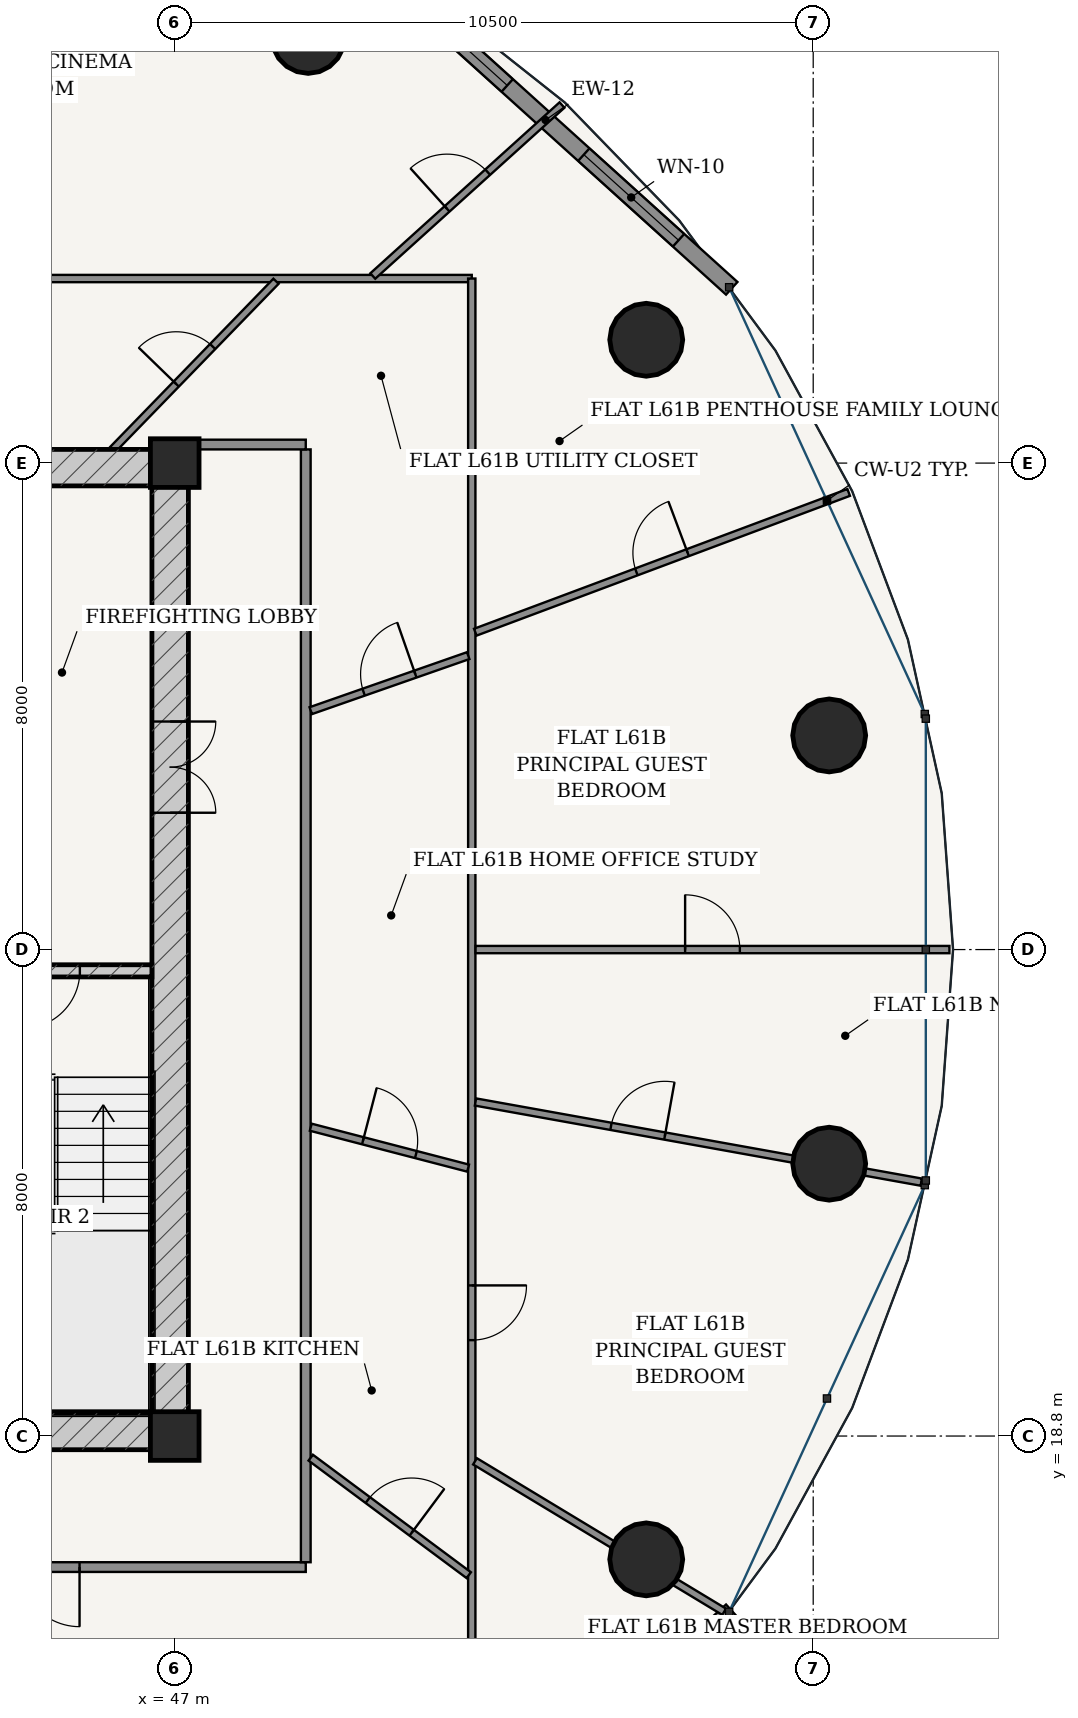
"""IFC4 building model, lengths in metres.
Left out: names, types, materials, properties, quantities, classifications, styles, units other than length and angle.
Written with IfcOpenShell. Run it as: python <this file> out.ifc"""

import sys

from ifc_helpers import new_model, si_unit, direction, frame, frame_2d, origin, origin_2d, place, context, subcontext, project, spatial, rectangle, hollow_circle, extrude, source, transform, mapped, element, fill, save


model = new_model("IFC4")
c1 = context("Model", 3, precision=1e-05, world=origin(), true_north=direction((-0.2419218956, 0.970295726276)))
c2 = subcontext(c1, "Body", "Model", "MODEL_VIEW")
j1 = project(units=[si_unit("LENGTHUNIT", "METRE"), si_unit("PLANEANGLEUNIT", "RADIAN")], contexts=[c1])
p1 = place(None, origin())
s1 = spatial("IfcSite", under=j1, at=p1, CompositionType="ELEMENT")
p2 = place(p1, origin())
s2 = spatial("IfcBuilding", under=s1, at=p2, CompositionType="ELEMENT")
p3 = place(p2, frame((0.0, 0.0, 231.9)))
s3 = spatial("IfcBuildingStorey", under=s2, at=p3, CompositionType="ELEMENT", Elevation=231.9)
for number, where, z_axis, x_axis in (
    (1, (47.0, 18.8, 0.0), (0.0, 0.0, 1.0), (1.0, 0.0, 0.0)),
    (2, (47.0, 34.8, 0.0), (0.0, 0.0, 1.0), (1.0, 0.0, 0.0)),
):
    element("IfcColumn", number, at=place(p3, frame(where, z_axis=z_axis, x_axis=x_axis)), inside=s3, PredefinedType="COLUMN", context=c2, shape_type="SweptSolid", body=[
        extrude(rectangle(XDim=0.8, YDim=0.8, at=origin_2d()), origin(), (0.0, 0.0, 1.0), 3.7),
    ])
p4 = place(p3, frame((28.775, 18.875, 0.0), z_axis=(0.0, 0.0, 1.0), x_axis=(1.0, 0.0, 0.0)))
e3 = element("IfcWall", 3, at=p4, inside=s3, PredefinedType="SHEAR", context=c2, shape_type="SweptSolid", body=[
    extrude(rectangle(XDim=18.45, YDim=0.6, at=frame_2d((9.225, 0.0))), origin(), (0.0, 0.0, 1.0), 3.435),
])
p5 = place(p4, frame((8.8, 0.0, 0.0)))
e4 = element("IfcOpeningElement", 4, at=p5, cuts=e3, PredefinedType="OPENING", context=c2, shape_type="SweptSolid", body=[
    extrude(rectangle(XDim=0.85, YDim=2.1, at=frame_2d((0.425, 1.05))), frame((0.0, 0.31, 0.0), z_axis=(0.0, -1.0, 0.0), x_axis=(1.0, 0.0, 0.0)), (0.0, 0.0, 1.0), 0.62),
])
p6 = place(p3, frame((28.775, 34.725, 0.0), z_axis=(0.0, 0.0, 1.0), x_axis=(1.0, 0.0, 0.0)))
e5 = element("IfcWall", 5, at=p6, inside=s3, PredefinedType="SHEAR", context=c2, shape_type="SweptSolid", body=[
    extrude(rectangle(XDim=18.45, YDim=0.6, at=frame_2d((9.225, 0.0))), origin(), (0.0, 0.0, 1.0), 3.435),
])
p7 = place(p3, frame((46.925, 19.175, 0.0), z_axis=(0.0, 0.0, 1.0), x_axis=(0.0, 1.0, 0.0)))
e6 = element("IfcWall", 6, at=p7, inside=s3, PredefinedType="SHEAR", context=c2, shape_type="SweptSolid", body=[
    extrude(rectangle(XDim=15.25, YDim=0.6, at=frame_2d((7.625, 0.0))), origin(), (0.0, 0.0, 1.0), 3.435),
])
p8 = place(p7, frame((9.875, 0.0, 0.0)))
e7 = element("IfcOpeningElement", 7, at=p8, cuts=e6, PredefinedType="OPENING", context=c2, shape_type="SweptSolid", body=[
    extrude(rectangle(XDim=1.5, YDim=2.2, at=frame_2d((0.75, 1.1))), frame((0.0, 0.31, 0.0), z_axis=(0.0, -1.0, 0.0), x_axis=(1.0, 0.0, 0.0)), (0.0, 0.0, 1.0), 0.62),
])
p9 = place(p3, frame((43.305, 26.45, 0.0), z_axis=(0.0, 0.0, 1.0), x_axis=(1.0, 0.0, 0.0)))
e8 = element("IfcWall", 8, at=p9, inside=s3, PredefinedType="SOLIDWALL", context=c2, shape_type="SweptSolid", body=[
    extrude(rectangle(XDim=3.32, YDim=0.2, at=frame_2d((1.66, 0.0))), origin(), (0.0, 0.0, 1.0), 3.435),
])
p10 = place(p9, frame((1.185, 0.0, 0.0)))
e9 = element("IfcOpeningElement", 9, at=p10, cuts=e8, PredefinedType="OPENING", context=c2, shape_type="SweptSolid", body=[
    extrude(rectangle(XDim=0.95, YDim=2.15, at=frame_2d((0.475, 1.075))), frame((0.0, 0.11, 0.0), z_axis=(0.0, -1.0, 0.0), x_axis=(1.0, 0.0, 0.0)), (0.0, 0.0, 1.0), 0.22),
])
for number, where, z_axis, x_axis in (
    (10, (57.763, 30.321, 0.0), (0.0, 0.0, 1.0), (1.0, 0.0, 0.0)),
    (11, (54.754, 36.828, 0.0), (0.0, 0.0, 1.0), (1.0, 0.0, 0.0)),
    (12, (49.195, 41.808, 0.0), (0.0, 0.0, 1.0), (1.0, 0.0, 0.0)),
    (13, (54.754, 16.772, 0.0), (0.0, 0.0, 1.0), (1.0, 0.0, 0.0)),
    (14, (57.763, 23.279, 0.0), (0.0, 0.0, 1.0), (1.0, 0.0, 0.0)),
):
    element("IfcColumn", number, at=place(p3, frame(where, z_axis=z_axis, x_axis=x_axis)), inside=s3, PredefinedType="COLUMN", context=c2, shape_type="SweptSolid", body=[
        extrude(hollow_circle(Radius=0.6, WallThickness=0.038, at=origin_2d()), origin(), (0.0, 0.0, 1.0), 3.7),
    ])
p11 = place(p3, frame((56.16, 37.674, 0.0), z_axis=(0.0, 0.0, 1.0), x_axis=(-0.741972126783, 0.670430729514, 0.0)))
e15 = element("IfcWall", 15, at=p11, inside=s3, PredefinedType="SOLIDWALL", context=c2, shape_type="SweptSolid", body=[
    extrude(rectangle(XDim=8.255, YDim=0.28, at=frame_2d((4.127, 0.0))), origin(), (0.0, 0.0, 1.0), 3.435),
])
p12 = place(p11, frame((1.179, 0.0, 0.85)))
e16 = element("IfcOpeningElement", 16, at=p12, cuts=e15, PredefinedType="OPENING", context=c2, shape_type="SweptSolid", body=[
    extrude(rectangle(XDim=2.1, YDim=1.95, at=frame_2d((1.05, 0.975))), frame((0.0, 0.15, 0.0), z_axis=(0.0, -1.0, 0.0), x_axis=(1.0, 0.0, 0.0)), (0.0, 0.0, 1.0), 0.3),
])
p13 = place(p11, frame((4.976, 0.0, 0.85)))
e17 = element("IfcOpeningElement", 17, at=p13, cuts=e15, PredefinedType="OPENING", context=c2, shape_type="SweptSolid", body=[
    extrude(rectangle(XDim=2.1, YDim=1.95, at=frame_2d((1.05, 0.975))), frame((0.0, 0.15, 0.0), z_axis=(0.0, -1.0, 0.0), x_axis=(1.0, 0.0, 0.0)), (0.0, 0.0, 1.0), 0.3),
])
p14 = place(p3, frame((50.035, 10.391, 0.0), z_axis=(0.0, 0.0, 1.0), x_axis=(0.741986838603, 0.670414447443, 0.0)))
e18 = element("IfcWall", 18, at=p14, inside=s3, PredefinedType="SOLIDWALL", context=c2, shape_type="SweptSolid", body=[
    extrude(rectangle(XDim=8.255, YDim=0.28, at=frame_2d((4.127, 0.0))), origin(), (0.0, 0.0, 1.0), 3.435),
])
p15 = place(p14, frame((1.179, 0.0, 0.85)))
e19 = element("IfcOpeningElement", 19, at=p15, cuts=e18, PredefinedType="OPENING", context=c2, shape_type="SweptSolid", body=[
    extrude(rectangle(XDim=2.1, YDim=1.95, at=frame_2d((1.05, 0.975))), frame((0.0, 0.15, 0.0), z_axis=(0.0, -1.0, 0.0), x_axis=(1.0, 0.0, 0.0)), (0.0, 0.0, 1.0), 0.3),
])
p16 = place(p14, frame((4.976, 0.0, 0.85)))
e20 = element("IfcOpeningElement", 20, at=p16, cuts=e18, PredefinedType="OPENING", context=c2, shape_type="SweptSolid", body=[
    extrude(rectangle(XDim=2.1, YDim=1.95, at=frame_2d((1.05, 0.975))), frame((0.0, 0.15, 0.0), z_axis=(0.0, -1.0, 0.0), x_axis=(1.0, 0.0, 0.0)), (0.0, 0.0, 1.0), 0.3),
])
p17 = place(p3, frame((34.32, 16.645, 0.0), z_axis=(0.0, 0.0, 1.0), x_axis=(1.0, 0.0, 0.0)))
e21 = element("IfcWall", 21, at=p17, inside=s3, PredefinedType="PARTITIONING", context=c2, shape_type="SweptSolid", body=[
    extrude(rectangle(XDim=14.835, YDim=0.16, at=frame_2d((7.417, 0.0))), origin(), (0.0, 0.0, 1.0), 2.951),
])
p18 = place(p17, frame((10.135, 0.0, 0.0)))
e22 = element("IfcOpeningElement", 22, at=p18, cuts=e21, PredefinedType="OPENING", context=c2, shape_type="SweptSolid", body=[
    extrude(rectangle(XDim=0.98, YDim=2.2, at=frame_2d((0.49, 1.1))), frame((0.0, 0.09, 0.0), z_axis=(0.0, -1.0, 0.0), x_axis=(1.0, 0.0, 0.0)), (0.0, 0.0, 1.0), 0.18),
])
p19 = place(p3, frame((49.155, 16.725, 0.0), z_axis=(0.0, 0.0, 1.0), x_axis=(0.0, 1.0, 0.0)))
e23 = element("IfcWall", 23, at=p19, inside=s3, PredefinedType="PARTITIONING", context=c2, shape_type="SweptSolid", body=[
    extrude(rectangle(XDim=18.3, YDim=0.16, at=frame_2d((9.15, 0.0))), origin(), (0.0, 0.0, 1.0), 2.951),
])
p20 = place(p3, frame((47.225, 35.105, 0.0), z_axis=(0.0, 0.0, 1.0), x_axis=(1.0, 0.0, 0.0)))
e24 = element("IfcWall", 24, at=p20, inside=s3, PredefinedType="PARTITIONING", context=c2, shape_type="SweptSolid", body=[
    extrude(rectangle(XDim=1.93, YDim=0.16, at=frame_2d((0.965, 0.0))), origin(), (0.0, 0.0, 1.0), 3.435),
])
p21 = place(p3, frame((44.415, 37.835, 0.0), z_axis=(0.0, 0.0, 1.0), x_axis=(1.0, 0.0, 0.0)))
e25 = element("IfcWall", 25, at=p21, inside=s3, PredefinedType="PARTITIONING", context=c2, shape_type="SweptSolid", body=[
    extrude(rectangle(XDim=7.47, YDim=0.12, at=frame_2d((3.735, 0.0))), origin(), (0.0, 0.0, 1.0), 2.951),
])
p22 = place(p3, frame((51.885, 37.835, 0.0), z_axis=(0.0, 0.0, 1.0), x_axis=(0.0, -1.0, 0.0)))
e26 = element("IfcWall", 26, at=p22, inside=s3, PredefinedType="PARTITIONING", context=c2, shape_type="SweptSolid", body=[
    extrude(rectangle(XDim=23.92, YDim=0.12, at=frame_2d((11.96, 0.0))), origin(), (0.0, 0.0, 1.0), 2.951),
])
p23 = place(p22, frame((16.558, 0.0, 0.0)))
e27 = element("IfcOpeningElement", 27, at=p23, cuts=e26, PredefinedType="OPENING", context=c2, shape_type="SweptSolid", body=[
    extrude(rectangle(XDim=0.9, YDim=2.15, at=frame_2d((0.45, 1.075))), frame((0.0, 0.07, 0.0), z_axis=(0.0, -1.0, 0.0), x_axis=(1.0, 0.0, 0.0)), (0.0, 0.0, 1.0), 0.14),
])
p24 = place(p3, frame((51.938, 18.384, 0.0), z_axis=(0.0, 0.0, 1.0), x_axis=(0.856058483833, -0.516878972543, 0.0)))
e28 = element("IfcWall", 28, at=p24, inside=s3, PredefinedType="PARTITIONING", context=c2, shape_type="SweptSolid", body=[
    extrude(rectangle(XDim=4.787, YDim=0.12, at=frame_2d((2.393, 0.0))), origin(), (0.0, 0.0, 1.0), 2.951),
])
p25 = place(p3, frame((51.946, 24.293, 0.0), z_axis=(0.0, 0.0, 1.0), x_axis=(0.984227185588, -0.176909149424, 0.0)))
e29 = element("IfcWall", 29, at=p25, inside=s3, PredefinedType="PARTITIONING", context=c2, shape_type="SweptSolid", body=[
    extrude(rectangle(XDim=7.448, YDim=0.12, at=frame_2d((3.724, 0.0))), origin(), (0.0, 0.0, 1.0), 2.951),
])
p26 = place(p25, frame((2.264, 0.0, 0.0)))
e30 = element("IfcOpeningElement", 30, at=p26, cuts=e29, PredefinedType="OPENING", context=c2, shape_type="SweptSolid", body=[
    extrude(rectangle(XDim=0.9, YDim=2.15, at=frame_2d((0.45, 1.075))), frame((0.0, 0.07, 0.0), z_axis=(0.0, -1.0, 0.0), x_axis=(1.0, 0.0, 0.0)), (0.0, 0.0, 1.0), 0.14),
])
p27 = place(p3, frame((51.947, 26.8, 0.0), z_axis=(0.0, 0.0, 1.0), x_axis=(1.0, 0.0, 0.0)))
e31 = element("IfcWall", 31, at=p27, inside=s3, PredefinedType="PARTITIONING", context=c2, shape_type="SweptSolid", body=[
    extrude(rectangle(XDim=7.793, YDim=0.12, at=frame_2d((3.896, 0.0))), origin(), (0.0, 0.0, 1.0), 2.951),
])
p28 = place(p27, frame((3.447, 0.0, 0.0)))
e32 = element("IfcOpeningElement", 32, at=p28, cuts=e31, PredefinedType="OPENING", context=c2, shape_type="SweptSolid", body=[
    extrude(rectangle(XDim=0.9, YDim=2.15, at=frame_2d((0.45, 1.075))), frame((0.0, 0.07, 0.0), z_axis=(0.0, -1.0, 0.0), x_axis=(1.0, 0.0, 0.0)), (0.0, 0.0, 1.0), 0.14),
])
p29 = place(p3, frame((51.943, 32.019, 0.0), z_axis=(0.0, 0.0, 1.0), x_axis=(0.936540194592, 0.350560214389, 0.0)))
e33 = element("IfcWall", 33, at=p29, inside=s3, PredefinedType="PARTITIONING", context=c2, shape_type="SweptSolid", body=[
    extrude(rectangle(XDim=6.556, YDim=0.12, at=frame_2d((3.278, 0.0))), origin(), (0.0, 0.0, 1.0), 2.951),
])
p30 = place(p29, frame((2.828, 0.0, 0.0)))
e34 = element("IfcOpeningElement", 34, at=p30, cuts=e33, PredefinedType="OPENING", context=c2, shape_type="SweptSolid", body=[
    extrude(rectangle(XDim=0.9, YDim=2.15, at=frame_2d((0.45, 1.075))), frame((0.0, 0.07, 0.0), z_axis=(0.0, -1.0, 0.0), x_axis=(1.0, 0.0, 0.0)), (0.0, 0.0, 1.0), 0.14),
])
p31 = place(p3, frame((50.257, 37.876, 0.0), z_axis=(0.0, 0.0, 1.0), x_axis=(0.741943837234, 0.670462036502, 0.0)))
e35 = element("IfcWall", 35, at=p31, inside=s3, PredefinedType="PARTITIONING", context=c2, shape_type="SweptSolid", body=[
    extrude(rectangle(XDim=4.194, YDim=0.12, at=frame_2d((2.097, 0.0))), origin(), (0.0, 0.0, 1.0), 2.951),
])
p32 = place(p31, frame((1.647, 0.0, 0.0)))
e36 = element("IfcOpeningElement", 36, at=p32, cuts=e35, PredefinedType="OPENING", context=c2, shape_type="SweptSolid", body=[
    extrude(rectangle(XDim=0.9, YDim=2.15, at=frame_2d((0.45, 1.075))), frame((0.0, 0.07, 0.0), z_axis=(0.0, -1.0, 0.0), x_axis=(1.0, 0.0, 0.0)), (0.0, 0.0, 1.0), 0.14),
])
p33 = place(p3, frame((49.237, 18.444, 0.0), z_axis=(0.0, 0.0, 1.0), x_axis=(0.802454010275, -0.596713969497, 0.0)))
e37 = element("IfcWall", 37, at=p33, inside=s3, PredefinedType="PARTITIONING", context=c2, shape_type="SweptSolid", body=[
    extrude(rectangle(XDim=3.238, YDim=0.12, at=frame_2d((1.619, 0.0))), origin(), (0.0, 0.0, 1.0), 3.11),
])
p34 = place(p33, frame((1.169, 0.0, 0.0)))
e38 = element("IfcOpeningElement", 38, at=p34, cuts=e37, PredefinedType="OPENING", context=c2, shape_type="SweptSolid", body=[
    extrude(rectangle(XDim=0.9, YDim=2.15, at=frame_2d((0.45, 1.075))), frame((0.0, 0.07, 0.0), z_axis=(0.0, -1.0, 0.0), x_axis=(1.0, 0.0, 0.0)), (0.0, 0.0, 1.0), 0.14),
])
p35 = place(p3, frame((49.237, 23.879, 0.0), z_axis=(0.0, 0.0, 1.0), x_axis=(0.967822506788, -0.251633851765, 0.0)))
e39 = element("IfcWall", 39, at=p35, inside=s3, PredefinedType="PARTITIONING", context=c2, shape_type="SweptSolid", body=[
    extrude(rectangle(XDim=2.674, YDim=0.12, at=frame_2d((1.337, 0.0))), origin(), (0.0, 0.0, 1.0), 3.435),
])
p36 = place(p35, frame((0.887, 0.0, 0.0)))
e40 = element("IfcOpeningElement", 40, at=p36, cuts=e39, PredefinedType="OPENING", context=c2, shape_type="SweptSolid", body=[
    extrude(rectangle(XDim=0.9, YDim=2.15, at=frame_2d((0.45, 1.075))), frame((0.0, 0.07, 0.0), z_axis=(0.0, -1.0, 0.0), x_axis=(1.0, 0.0, 0.0)), (0.0, 0.0, 1.0), 0.14),
])
p37 = place(p3, frame((49.237, 30.729, 0.0), z_axis=(0.0, 0.0, 1.0), x_axis=(0.94398177501, 0.329997588549, 0.0)))
e41 = element("IfcWall", 41, at=p37, inside=s3, PredefinedType="PARTITIONING", context=c2, shape_type="SweptSolid", body=[
    extrude(rectangle(XDim=2.743, YDim=0.12, at=frame_2d((1.372, 0.0))), origin(), (0.0, 0.0, 1.0), 3.11),
])
p38 = place(p37, frame((0.922, 0.0, 0.0)))
e42 = element("IfcOpeningElement", 42, at=p38, cuts=e41, PredefinedType="OPENING", context=c2, shape_type="SweptSolid", body=[
    extrude(rectangle(XDim=0.9, YDim=2.15, at=frame_2d((0.45, 1.075))), frame((0.0, 0.07, 0.0), z_axis=(0.0, -1.0, 0.0), x_axis=(1.0, 0.0, 0.0)), (0.0, 0.0, 1.0), 0.14),
])
p39 = place(p3, frame((45.983, 35.026, 0.0), z_axis=(0.0, 0.0, 1.0), x_axis=(0.696410097703, 0.717644045344, 0.0)))
e43 = element("IfcWall", 43, at=p39, inside=s3, PredefinedType="PARTITIONING", context=c2, shape_type="SweptSolid", body=[
    extrude(rectangle(XDim=3.852, YDim=0.12, at=frame_2d((1.926, 0.0))), origin(), (0.0, 0.0, 1.0), 2.951),
])
p40 = place(p39, frame((1.496, 0.0, 0.0)))
e44 = element("IfcOpeningElement", 44, at=p40, cuts=e43, PredefinedType="OPENING", context=c2, shape_type="SweptSolid", body=[
    extrude(rectangle(XDim=0.86, YDim=2.15, at=frame_2d((0.43, 1.075))), frame((0.0, 0.07, 0.0), z_axis=(0.0, -1.0, 0.0), x_axis=(1.0, 0.0, 0.0)), (0.0, 0.0, 1.0), 0.14),
])
m1 = source(origin(), c2, "Body", "SweptSolid", [
    extrude(rectangle(XDim=2.1, YDim=1.95, at=frame_2d((1.05, 0.975))), frame((0.0, 0.03, 0.0), z_axis=(0.0, -1.0, 0.0), x_axis=(1.0, 0.0, 0.0)), (0.0, 0.0, 1.0), 0.06),
])
p41 = place(p12, origin())
e45 = element("IfcWindow", 45, at=p41, inside=s3, PartitioningType="SINGLE_PANEL", PredefinedType="WINDOW", context=c2, shape_type="MappedRepresentation", body=[
    mapped(m1, transform((0.0, 0.0, 0.0), scale=1.0)),
])
fill(e16, e45)
p42 = place(p13, origin())
e46 = element("IfcWindow", 46, at=p42, inside=s3, PartitioningType="SINGLE_PANEL", PredefinedType="WINDOW", context=c2, shape_type="MappedRepresentation", body=[
    mapped(m1, transform((0.0, 0.0, 0.0), scale=1.0)),
])
fill(e17, e46)
m2 = source(origin(), c2, "Body", "SweptSolid", [
    extrude(rectangle(XDim=1.5, YDim=2.2, at=frame_2d((0.75, 1.1))), frame((0.0, 0.025, 0.0), z_axis=(0.0, -1.0, 0.0), x_axis=(1.0, 0.0, 0.0)), (0.0, 0.0, 1.0), 0.05),
])
p43 = place(p8, frame((1.5, 0.0, 0.0), z_axis=(0.0, 0.0, 1.0), x_axis=(-1.0, 0.0, 0.0)))
e47 = element("IfcDoor", 47, at=p43, inside=s3, OperationType="DOUBLE_DOOR_SINGLE_SWING", PredefinedType="DOOR", context=c2, shape_type="MappedRepresentation", body=[
    mapped(m2, transform((0.0, 0.0, 0.0), scale=1.0)),
])
fill(e7, e47)
m3 = source(origin(), c2, "Body", "SweptSolid", [
    extrude(rectangle(XDim=0.95, YDim=2.15, at=frame_2d((0.475, 1.075))), frame((0.0, 0.025, 0.0), z_axis=(0.0, -1.0, 0.0), x_axis=(1.0, 0.0, 0.0)), (0.0, 0.0, 1.0), 0.05),
])
p44 = place(p10, frame((0.95, 0.0, 0.0), z_axis=(0.0, 0.0, 1.0), x_axis=(-1.0, 0.0, 0.0)))
e48 = element("IfcDoor", 48, at=p44, inside=s3, OperationType="SINGLE_SWING_RIGHT", PredefinedType="DOOR", context=c2, shape_type="MappedRepresentation", body=[
    mapped(m3, transform((0.0, 0.0, 0.0), scale=1.0)),
])
fill(e9, e48)
m4 = source(origin(), c2, "Body", "SweptSolid", [
    extrude(rectangle(XDim=0.98, YDim=2.2, at=frame_2d((0.49, 1.1))), frame((0.0, 0.025, 0.0), z_axis=(0.0, -1.0, 0.0), x_axis=(1.0, 0.0, 0.0)), (0.0, 0.0, 1.0), 0.05),
])
p45 = place(p18, frame((0.98, 0.0, 0.0), z_axis=(0.0, 0.0, 1.0), x_axis=(-1.0, 0.0, 0.0)))
e49 = element("IfcDoor", 49, at=p45, inside=s3, OperationType="SINGLE_SWING_LEFT", PredefinedType="DOOR", context=c2, shape_type="MappedRepresentation", body=[
    mapped(m4, transform((0.0, 0.0, 0.0), scale=1.0)),
])
fill(e22, e49)
m5 = source(origin(), c2, "Body", "SweptSolid", [
    extrude(rectangle(XDim=0.9, YDim=2.15, at=frame_2d((0.45, 1.075))), frame((0.0, 0.025, 0.0), z_axis=(0.0, -1.0, 0.0), x_axis=(1.0, 0.0, 0.0)), (0.0, 0.0, 1.0), 0.05),
])
p46 = place(p34, origin())
e50 = element("IfcDoor", 50, at=p46, inside=s3, OperationType="SINGLE_SWING_RIGHT", PredefinedType="DOOR", context=c2, shape_type="MappedRepresentation", body=[
    mapped(m5, transform((0.0, 0.0, 0.0), scale=1.0)),
])
fill(e38, e50)
p47 = place(p36, origin())
e51 = element("IfcDoor", 51, at=p47, inside=s3, OperationType="SINGLE_SWING_LEFT", PredefinedType="DOOR", context=c2, shape_type="MappedRepresentation", body=[
    mapped(m5, transform((0.0, 0.0, 0.0), scale=1.0)),
])
fill(e40, e51)
p48 = place(p38, origin())
e52 = element("IfcDoor", 52, at=p48, inside=s3, OperationType="SINGLE_SWING_RIGHT", PredefinedType="DOOR", context=c2, shape_type="MappedRepresentation", body=[
    mapped(m5, transform((0.0, 0.0, 0.0), scale=1.0)),
])
fill(e42, e52)
m6 = source(origin(), c2, "Body", "SweptSolid", [
    extrude(rectangle(XDim=0.86, YDim=2.15, at=frame_2d((0.43, 1.075))), frame((0.0, 0.025, 0.0), z_axis=(0.0, -1.0, 0.0), x_axis=(1.0, 0.0, 0.0)), (0.0, 0.0, 1.0), 0.05),
])
p49 = place(p40, origin())
e53 = element("IfcDoor", 53, at=p49, inside=s3, OperationType="SINGLE_SWING_LEFT", PredefinedType="DOOR", context=c2, shape_type="MappedRepresentation", body=[
    mapped(m6, transform((0.0, 0.0, 0.0), scale=1.0)),
])
fill(e44, e53)
p50 = place(p23, origin())
e54 = element("IfcDoor", 54, at=p50, inside=s3, OperationType="SINGLE_SWING_LEFT", PredefinedType="DOOR", context=c2, shape_type="MappedRepresentation", body=[
    mapped(m5, transform((0.0, 0.0, 0.0), scale=1.0)),
])
fill(e27, e54)
p51 = place(p26, origin())
e55 = element("IfcDoor", 55, at=p51, inside=s3, OperationType="SINGLE_SWING_RIGHT", PredefinedType="DOOR", context=c2, shape_type="MappedRepresentation", body=[
    mapped(m5, transform((0.0, 0.0, 0.0), scale=1.0)),
])
fill(e30, e55)
p52 = place(p28, origin())
e56 = element("IfcDoor", 56, at=p52, inside=s3, OperationType="SINGLE_SWING_LEFT", PredefinedType="DOOR", context=c2, shape_type="MappedRepresentation", body=[
    mapped(m5, transform((0.0, 0.0, 0.0), scale=1.0)),
])
fill(e32, e56)
p53 = place(p30, origin())
e57 = element("IfcDoor", 57, at=p53, inside=s3, OperationType="SINGLE_SWING_RIGHT", PredefinedType="DOOR", context=c2, shape_type="MappedRepresentation", body=[
    mapped(m5, transform((0.0, 0.0, 0.0), scale=1.0)),
])
fill(e34, e57)
p54 = place(p32, origin())
e58 = element("IfcDoor", 58, at=p54, inside=s3, OperationType="SINGLE_SWING_LEFT", PredefinedType="DOOR", context=c2, shape_type="MappedRepresentation", body=[
    mapped(m5, transform((0.0, 0.0, 0.0), scale=1.0)),
])
fill(e36, e58)
save(model, sys.argv[1])
